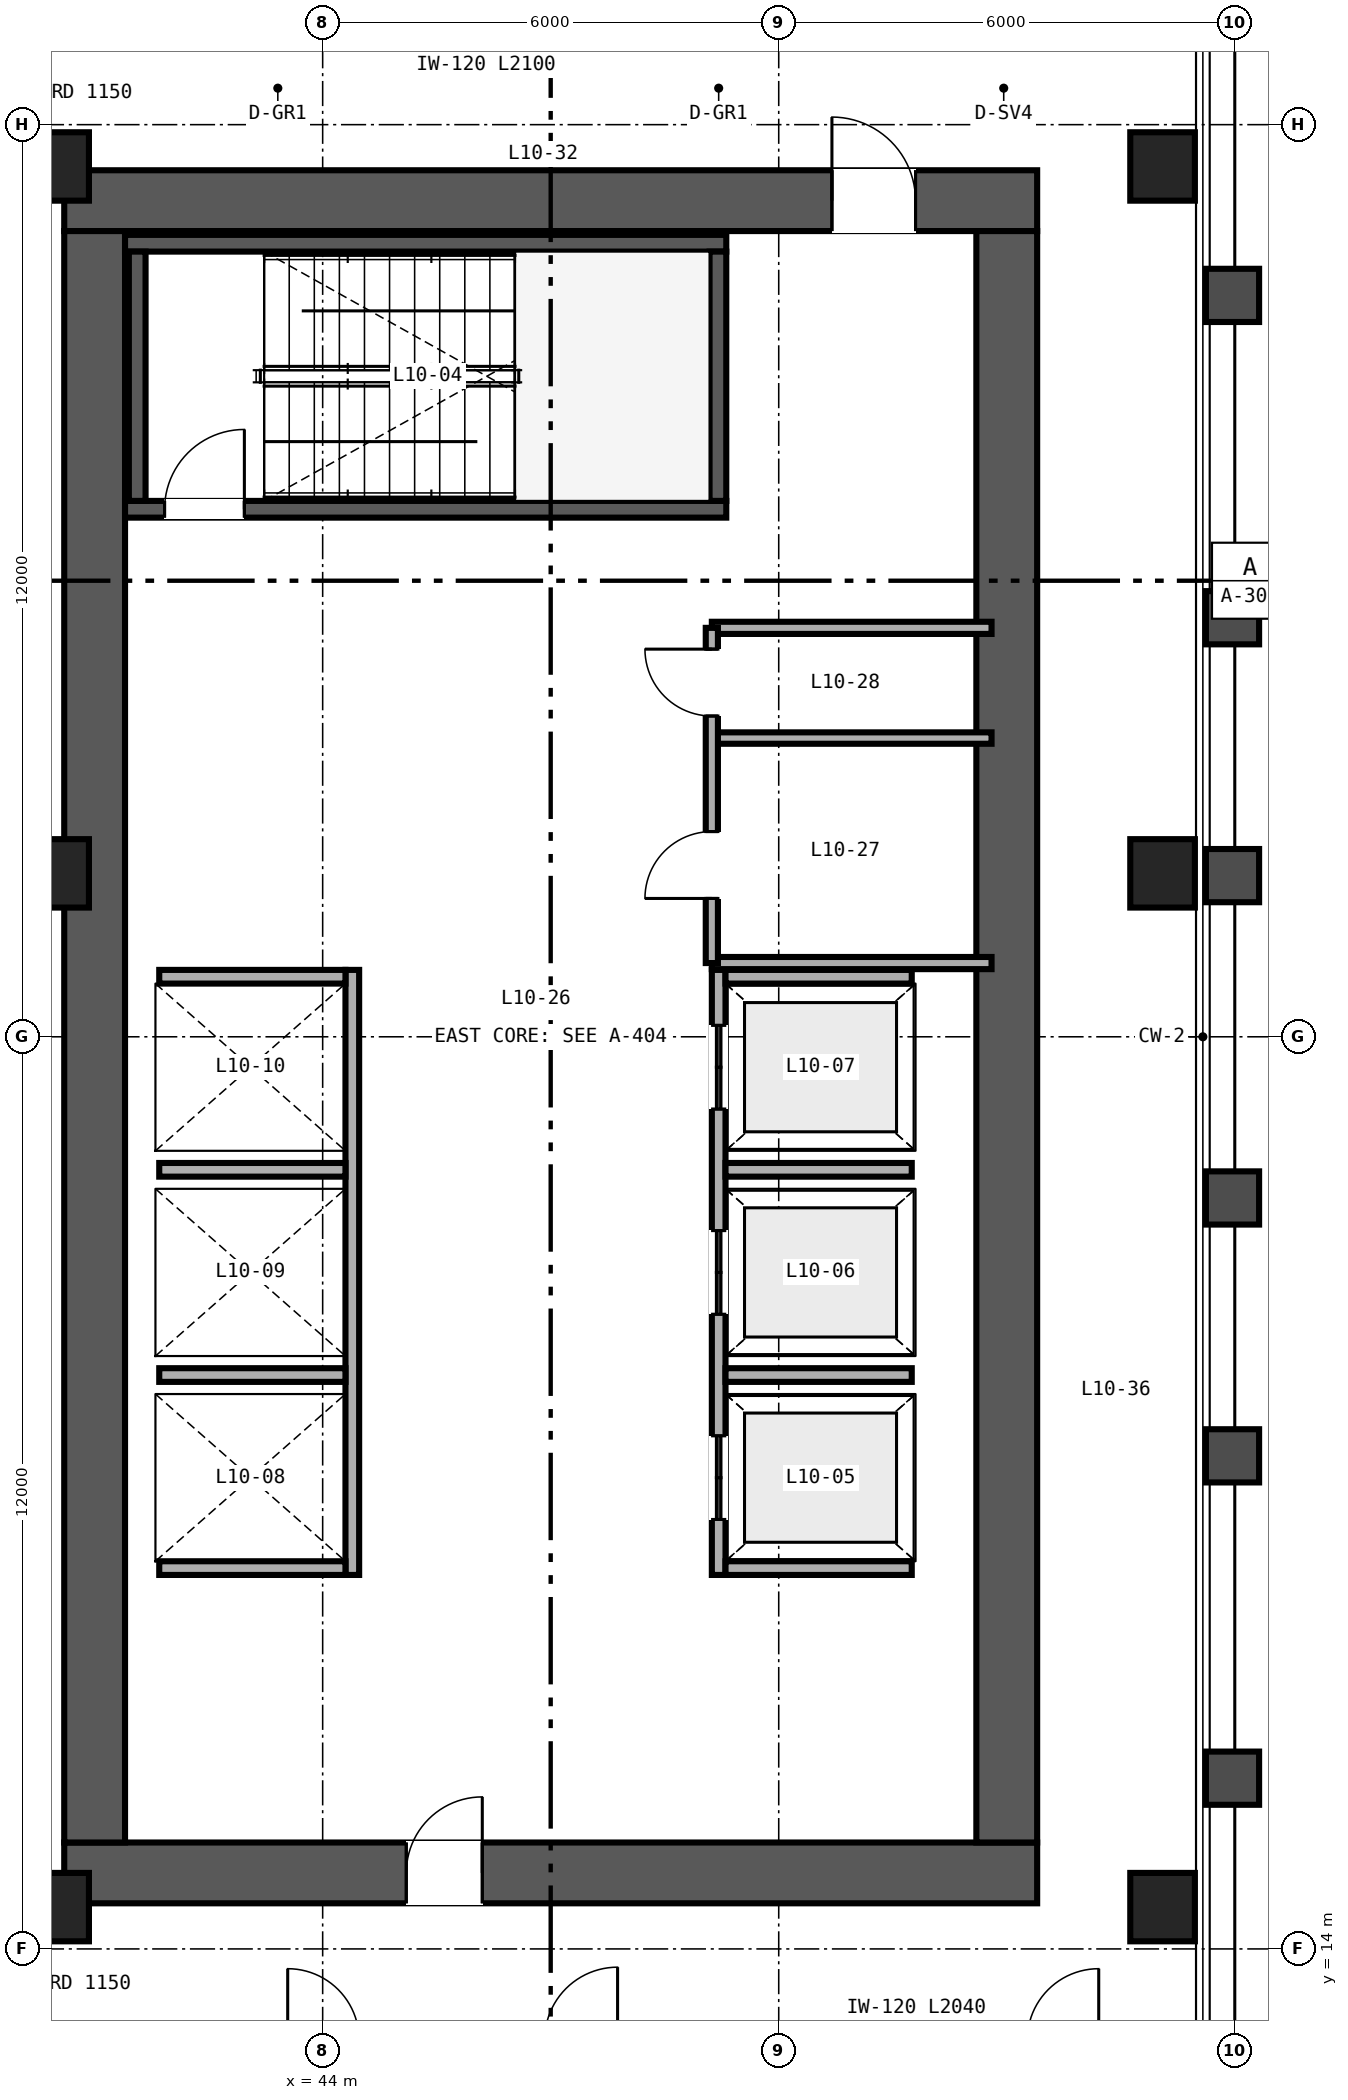
"""IFC4 building model, lengths in metres.
Left out: names, types, materials, properties, quantities, classifications, styles, units other than length and angle.
Written with IfcOpenShell. Run it as: python <this file> out.ifc"""

import sys

from ifc_helpers import new_model, si_unit, direction, frame, frame_2d, origin, origin_2d, place, context, subcontext, project, spatial, rectangle, hollow_rectangle, extrude, source, transform, mapped, element, fill, save


model = new_model("IFC4")
c1 = context("Model", 3, precision=1e-05, world=origin(), true_north=direction((0.0, 1.0)))
c2 = subcontext(c1, "Body", "Model", "MODEL_VIEW")
j1 = project(units=[si_unit("LENGTHUNIT", "METRE"), si_unit("PLANEANGLEUNIT", "RADIAN")], contexts=[c1])
p1 = place(None, origin())
s1 = spatial("IfcSite", under=j1, at=p1, CompositionType="ELEMENT")
p2 = place(p1, origin())
s2 = spatial("IfcBuilding", under=s1, at=p2, CompositionType="ELEMENT")
p3 = place(p2, frame((0.0, 0.0, 45.6)))
s3 = spatial("IfcBuildingStorey", under=s2, at=p3, CompositionType="ELEMENT", Elevation=45.6)
p4 = place(p3, frame((40.6, 15.0, 0.0), z_axis=(0.0, 0.0, 1.0), x_axis=(1.0, 0.0, 0.0)))
e1 = element("IfcWall", 1, at=p4, inside=s3, PredefinedType="SHEAR", context=c2, shape_type="SweptSolid", body=[
    extrude(rectangle(XDim=12.8, YDim=0.8, at=frame_2d((6.4, 0.0))), origin(), (0.0, 0.0, 1.0), 3.35),
])
p5 = place(p4, frame((4.5, 0.0, 0.0)))
e2 = element("IfcOpeningElement", 2, at=p5, cuts=e1, PredefinedType="OPENING", context=c2, shape_type="SweptSolid", body=[
    extrude(rectangle(XDim=1.0, YDim=2.15, at=frame_2d((0.5, 1.075))), frame((0.0, 0.41, 0.0), z_axis=(0.0, -1.0, 0.0), x_axis=(1.0, 0.0, 0.0)), (0.0, 0.0, 1.0), 0.82),
])
p6 = place(p3, frame((40.6, 37.0, 0.0), z_axis=(0.0, 0.0, 1.0), x_axis=(1.0, 0.0, 0.0)))
e3 = element("IfcWall", 3, at=p6, inside=s3, PredefinedType="SHEAR", context=c2, shape_type="SweptSolid", body=[
    extrude(rectangle(XDim=12.8, YDim=0.8, at=frame_2d((6.4, 0.0))), origin(), (0.0, 0.0, 1.0), 3.35),
])
p7 = place(p6, frame((10.1, 0.0, 0.0)))
e4 = element("IfcOpeningElement", 4, at=p7, cuts=e3, PredefinedType="OPENING", context=c2, shape_type="SweptSolid", body=[
    extrude(rectangle(XDim=1.1, YDim=2.15, at=frame_2d((0.55, 1.075))), frame((0.0, 0.41, 0.0), z_axis=(0.0, -1.0, 0.0), x_axis=(1.0, 0.0, 0.0)), (0.0, 0.0, 1.0), 0.82),
])
for number, where, z_axis, x_axis in (
    (5, (41.0, 15.4, 0.0), (0.0, 0.0, 1.0), (0.0, 1.0, 0.0)),
    (6, (53.0, 15.4, 0.0), (0.0, 0.0, 1.0), (0.0, 1.0, 0.0)),
):
    element("IfcWall", number, at=place(p3, frame(where, z_axis=z_axis, x_axis=x_axis)), inside=s3, PredefinedType="SHEAR", context=c2, shape_type="SweptSolid", body=[
        extrude(rectangle(XDim=21.2, YDim=0.8, at=frame_2d((10.6, 0.0))), origin(), (0.0, 0.0, 1.0), 3.35),
    ])
p8 = place(p3, frame((41.4, 32.94, 0.0), z_axis=(0.0, 0.0, 1.0), x_axis=(1.0, 0.0, 0.0)))
e7 = element("IfcWall", 7, at=p8, inside=s3, PredefinedType="SHEAR", context=c2, shape_type="SweptSolid", body=[
    extrude(rectangle(XDim=7.91, YDim=0.22, at=frame_2d((3.955, 0.0))), origin(), (0.0, 0.0, 1.0), 3.4),
])
p9 = place(p8, frame((0.52, 0.0, 0.0)))
e8 = element("IfcOpeningElement", 8, at=p9, cuts=e7, PredefinedType="OPENING", context=c2, shape_type="SweptSolid", body=[
    extrude(rectangle(XDim=1.05, YDim=2.15, at=frame_2d((0.525, 1.075))), frame((0.0, 0.12, 0.0), z_axis=(0.0, -1.0, 0.0), x_axis=(1.0, 0.0, 0.0)), (0.0, 0.0, 1.0), 0.24),
])
p10 = place(p3, frame((41.4, 36.44, 0.0), z_axis=(0.0, 0.0, 1.0), x_axis=(1.0, 0.0, 0.0)))
e9 = element("IfcWall", 9, at=p10, inside=s3, PredefinedType="SHEAR", context=c2, shape_type="SweptSolid", body=[
    extrude(rectangle(XDim=7.91, YDim=0.22, at=frame_2d((3.955, 0.0))), origin(), (0.0, 0.0, 1.0), 3.4),
])
for number, where, z_axis, x_axis in (
    (10, (41.56, 33.05, 0.0), (0.0, 0.0, 1.0), (0.0, 1.0, 0.0)),
    (11, (49.2, 33.05, 0.0), (0.0, 0.0, 1.0), (0.0, 1.0, 0.0)),
):
    element("IfcWall", number, at=place(p3, frame(where, z_axis=z_axis, x_axis=x_axis)), inside=s3, PredefinedType="SHEAR", context=c2, shape_type="SweptSolid", body=[
        extrude(rectangle(XDim=3.28, YDim=0.22, at=frame_2d((1.64, 0.0))), origin(), (0.0, 0.0, 1.0), 3.4),
    ])
m1 = source(origin(), c2, "Body", "SweptSolid", [
    extrude(hollow_rectangle(XDim=0.85, YDim=0.9, WallThickness=0.04, at=origin_2d()), origin(), (0.0, 0.0, 1.0), 3.35),
])
for number, where, z_axis, x_axis in (
    (12, (40.5, 14.55, 0.0), (0.0, 0.0, 1.0), (1.0, 0.0, 0.0)),
    (13, (55.05, 14.55, 0.0), (0.0, 0.0, 1.0), (1.0, 0.0, 0.0)),
    (14, (40.5, 28.15, 0.0), (0.0, 0.0, 1.0), (1.0, 0.0, 0.0)),
    (15, (55.05, 28.15, 0.0), (0.0, 0.0, 1.0), (1.0, 0.0, 0.0)),
    (16, (40.5, 37.45, 0.0), (0.0, 0.0, 1.0), (1.0, 0.0, 0.0)),
    (17, (55.05, 37.45, 0.0), (0.0, 0.0, 1.0), (1.0, 0.0, 0.0)),
):
    element("IfcColumn", number, at=place(p3, frame(where, z_axis=z_axis, x_axis=x_axis)), inside=s3, PredefinedType="COLUMN", context=c2, shape_type="MappedRepresentation", body=[
        mapped(m1, transform((0.0, 0.0, 0.0), scale=1.0)),
    ])
p11 = place(p3, frame((49.21, 18.92, 0.0), z_axis=(0.0, 0.0, 1.0), x_axis=(0.0, 1.0, 0.0)))
e18 = element("IfcWall", 18, at=p11, inside=s3, PredefinedType="SOLIDWALL", context=c2, shape_type="SweptSolid", body=[
    extrude(rectangle(XDim=7.96, YDim=0.18, at=frame_2d((3.98, 0.0))), origin(), (0.0, 0.0, 1.0), 3.35),
])
p12 = place(p11, frame((0.73, 0.0, 0.0)))
e19 = element("IfcOpeningElement", 19, at=p12, cuts=e18, PredefinedType="OPENING", context=c2, shape_type="SweptSolid", body=[
    extrude(rectangle(XDim=1.1, YDim=2.2, at=frame_2d((0.55, 1.1))), frame((0.0, 0.1, 0.0), z_axis=(0.0, -1.0, 0.0), x_axis=(1.0, 0.0, 0.0)), (0.0, 0.0, 1.0), 0.2),
])
p13 = place(p11, frame((3.43, 0.0, 0.0)))
e20 = element("IfcOpeningElement", 20, at=p13, cuts=e18, PredefinedType="OPENING", context=c2, shape_type="SweptSolid", body=[
    extrude(rectangle(XDim=1.1, YDim=2.2, at=frame_2d((0.55, 1.1))), frame((0.0, 0.1, 0.0), z_axis=(0.0, -1.0, 0.0), x_axis=(1.0, 0.0, 0.0)), (0.0, 0.0, 1.0), 0.2),
])
p14 = place(p11, frame((6.13, 0.0, 0.0)))
e21 = element("IfcOpeningElement", 21, at=p14, cuts=e18, PredefinedType="OPENING", context=c2, shape_type="SweptSolid", body=[
    extrude(rectangle(XDim=1.1, YDim=2.2, at=frame_2d((0.55, 1.1))), frame((0.0, 0.1, 0.0), z_axis=(0.0, -1.0, 0.0), x_axis=(1.0, 0.0, 0.0)), (0.0, 0.0, 1.0), 0.2),
])
for number, where, z_axis, x_axis in (
    (22, (49.3, 19.01, 0.0), (0.0, 0.0, 1.0), (1.0, 0.0, 0.0)),
    (23, (49.3, 26.79, 0.0), (0.0, 0.0, 1.0), (1.0, 0.0, 0.0)),
    (24, (49.3, 21.55, 0.0), (0.0, 0.0, 1.0), (1.0, 0.0, 0.0)),
    (25, (49.3, 24.25, 0.0), (0.0, 0.0, 1.0), (1.0, 0.0, 0.0)),
):
    element("IfcWall", number, at=place(p3, frame(where, z_axis=z_axis, x_axis=x_axis)), inside=s3, PredefinedType="SOLIDWALL", context=c2, shape_type="SweptSolid", body=[
        extrude(rectangle(XDim=2.45, YDim=0.18, at=frame_2d((1.225, 0.0))), origin(), (0.0, 0.0, 1.0), 3.35),
    ])
p15 = place(p3, frame((44.39, 18.92, 0.0), z_axis=(0.0, 0.0, 1.0), x_axis=(0.0, 1.0, 0.0)))
e26 = element("IfcWall", 26, at=p15, inside=s3, PredefinedType="SOLIDWALL", context=c2, shape_type="SweptSolid", body=[
    extrude(rectangle(XDim=7.96, YDim=0.18, at=frame_2d((3.98, 0.0))), origin(), (0.0, 0.0, 1.0), 3.35),
])
for number, where, z_axis, x_axis in (
    (27, (41.85, 19.01, 0.0), (0.0, 0.0, 1.0), (1.0, 0.0, 0.0)),
    (28, (41.85, 26.79, 0.0), (0.0, 0.0, 1.0), (1.0, 0.0, 0.0)),
    (29, (41.85, 21.55, 0.0), (0.0, 0.0, 1.0), (1.0, 0.0, 0.0)),
    (30, (41.85, 24.25, 0.0), (0.0, 0.0, 1.0), (1.0, 0.0, 0.0)),
):
    element("IfcWall", number, at=place(p3, frame(where, z_axis=z_axis, x_axis=x_axis)), inside=s3, PredefinedType="SOLIDWALL", context=c2, shape_type="SweptSolid", body=[
        extrude(rectangle(XDim=2.45, YDim=0.18, at=frame_2d((1.225, 0.0))), origin(), (0.0, 0.0, 1.0), 3.35),
    ])
p16 = place(p3, frame((49.12, 26.97, 0.0), z_axis=(0.0, 0.0, 1.0), x_axis=(1.0, 0.0, 0.0)))
e31 = element("IfcWall", 31, at=p16, inside=s3, PredefinedType="PARTITIONING", context=c2, shape_type="SweptSolid", body=[
    extrude(rectangle(XDim=3.68, YDim=0.16, at=frame_2d((1.84, 0.0))), origin(), (0.0, 0.0, 1.0), 3.35),
])
p17 = place(p3, frame((49.12, 31.38, 0.0), z_axis=(0.0, 0.0, 1.0), x_axis=(1.0, 0.0, 0.0)))
e32 = element("IfcWall", 32, at=p17, inside=s3, PredefinedType="PARTITIONING", context=c2, shape_type="SweptSolid", body=[
    extrude(rectangle(XDim=3.68, YDim=0.16, at=frame_2d((1.84, 0.0))), origin(), (0.0, 0.0, 1.0), 2.36),
])
p18 = place(p3, frame((49.12, 29.93, 0.0), z_axis=(0.0, 0.0, 1.0), x_axis=(1.0, 0.0, 0.0)))
e33 = element("IfcWall", 33, at=p18, inside=s3, PredefinedType="PARTITIONING", context=c2, shape_type="SweptSolid", body=[
    extrude(rectangle(XDim=3.68, YDim=0.15, at=frame_2d((1.84, 0.0))), origin(), (0.0, 0.0, 1.0), 3.35),
])
p19 = place(p3, frame((49.12, 26.97, 0.0), z_axis=(0.0, 0.0, 1.0), x_axis=(0.0, 1.0, 0.0)))
e34 = element("IfcWall", 34, at=p19, inside=s3, PredefinedType="PARTITIONING", context=c2, shape_type="SweptSolid", body=[
    extrude(rectangle(XDim=4.41, YDim=0.16, at=frame_2d((2.205, 0.0))), origin(), (0.0, 0.0, 1.0), 2.36),
])
p20 = place(p19, frame((0.85, 0.0, 0.0)))
e35 = element("IfcOpeningElement", 35, at=p20, cuts=e34, PredefinedType="OPENING", context=c2, shape_type="SweptSolid", body=[
    extrude(rectangle(XDim=0.88, YDim=2.15, at=frame_2d((0.44, 1.075))), frame((0.0, 0.09, 0.0), z_axis=(0.0, -1.0, 0.0), x_axis=(1.0, 0.0, 0.0)), (0.0, 0.0, 1.0), 0.18),
])
p21 = place(p19, frame((3.25, 0.0, 0.0)))
e36 = element("IfcOpeningElement", 36, at=p21, cuts=e34, PredefinedType="OPENING", context=c2, shape_type="SweptSolid", body=[
    extrude(rectangle(XDim=0.88, YDim=2.15, at=frame_2d((0.44, 1.075))), frame((0.0, 0.09, 0.0), z_axis=(0.0, -1.0, 0.0), x_axis=(1.0, 0.0, 0.0)), (0.0, 0.0, 1.0), 0.18),
])
m2 = source(origin(), c2, "Body", "SweptSolid", [
    extrude(rectangle(XDim=1.05, YDim=2.15, at=frame_2d((0.525, 1.075))), frame((0.0, 0.025, 0.0), z_axis=(0.0, -1.0, 0.0), x_axis=(1.0, 0.0, 0.0)), (0.0, 0.0, 1.0), 0.05),
])
p22 = place(p9, origin())
e37 = element("IfcDoor", 37, at=p22, inside=s3, OperationType="SINGLE_SWING_RIGHT", PredefinedType="DOOR", context=c2, shape_type="MappedRepresentation", body=[
    mapped(m2, transform((0.0, 0.0, 0.0), scale=1.0)),
])
fill(e8, e37)
m3 = source(origin(), c2, "Body", "SweptSolid", [
    extrude(rectangle(XDim=1.1, YDim=2.2, at=frame_2d((0.55, 1.1))), frame((0.0, 0.025, 0.0), z_axis=(0.0, -1.0, 0.0), x_axis=(1.0, 0.0, 0.0)), (0.0, 0.0, 1.0), 0.05),
])
p23 = place(p12, origin())
e38 = element("IfcDoor", 38, at=p23, inside=s3, OperationType="DOUBLE_DOOR_SLIDING", PredefinedType="DOOR", context=c2, shape_type="MappedRepresentation", body=[
    mapped(m3, transform((0.0, 0.0, 0.0), scale=1.0)),
])
fill(e19, e38)
p24 = place(p13, origin())
e39 = element("IfcDoor", 39, at=p24, inside=s3, OperationType="DOUBLE_DOOR_SLIDING", PredefinedType="DOOR", context=c2, shape_type="MappedRepresentation", body=[
    mapped(m3, transform((0.0, 0.0, 0.0), scale=1.0)),
])
fill(e20, e39)
p25 = place(p14, origin())
e40 = element("IfcDoor", 40, at=p25, inside=s3, OperationType="DOUBLE_DOOR_SLIDING", PredefinedType="DOOR", context=c2, shape_type="MappedRepresentation", body=[
    mapped(m3, transform((0.0, 0.0, 0.0), scale=1.0)),
])
fill(e21, e40)
m4 = source(origin(), c2, "Body", "SweptSolid", [
    extrude(rectangle(XDim=1.0, YDim=2.15, at=frame_2d((0.5, 1.075))), frame((0.0, 0.025, 0.0), z_axis=(0.0, -1.0, 0.0), x_axis=(1.0, 0.0, 0.0)), (0.0, 0.0, 1.0), 0.05),
])
p26 = place(p5, origin())
e41 = element("IfcDoor", 41, at=p26, inside=s3, OperationType="SINGLE_SWING_RIGHT", PredefinedType="DOOR", context=c2, shape_type="MappedRepresentation", body=[
    mapped(m4, transform((0.0, 0.0, 0.0), scale=1.0)),
])
fill(e2, e41)
m5 = source(origin(), c2, "Body", "SweptSolid", [
    extrude(rectangle(XDim=1.1, YDim=2.15, at=frame_2d((0.55, 1.075))), frame((0.0, 0.025, 0.0), z_axis=(0.0, -1.0, 0.0), x_axis=(1.0, 0.0, 0.0)), (0.0, 0.0, 1.0), 0.05),
])
p27 = place(p7, origin())
e42 = element("IfcDoor", 42, at=p27, inside=s3, OperationType="SINGLE_SWING_LEFT", PredefinedType="DOOR", context=c2, shape_type="MappedRepresentation", body=[
    mapped(m5, transform((0.0, 0.0, 0.0), scale=1.0)),
])
fill(e4, e42)
m6 = source(origin(), c2, "Body", "SweptSolid", [
    extrude(rectangle(XDim=0.88, YDim=2.15, at=frame_2d((0.44, 1.075))), frame((0.0, 0.025, 0.0), z_axis=(0.0, -1.0, 0.0), x_axis=(1.0, 0.0, 0.0)), (0.0, 0.0, 1.0), 0.05),
])
p28 = place(p20, origin())
e43 = element("IfcDoor", 43, at=p28, inside=s3, OperationType="SINGLE_SWING_LEFT", PredefinedType="DOOR", context=c2, shape_type="MappedRepresentation", body=[
    mapped(m6, transform((0.0, 0.0, 0.0), scale=1.0)),
])
fill(e35, e43)
p29 = place(p21, origin())
e44 = element("IfcDoor", 44, at=p29, inside=s3, OperationType="SINGLE_SWING_RIGHT", PredefinedType="DOOR", context=c2, shape_type="MappedRepresentation", body=[
    mapped(m6, transform((0.0, 0.0, 0.0), scale=1.0)),
])
fill(e36, e44)
save(model, sys.argv[1])
